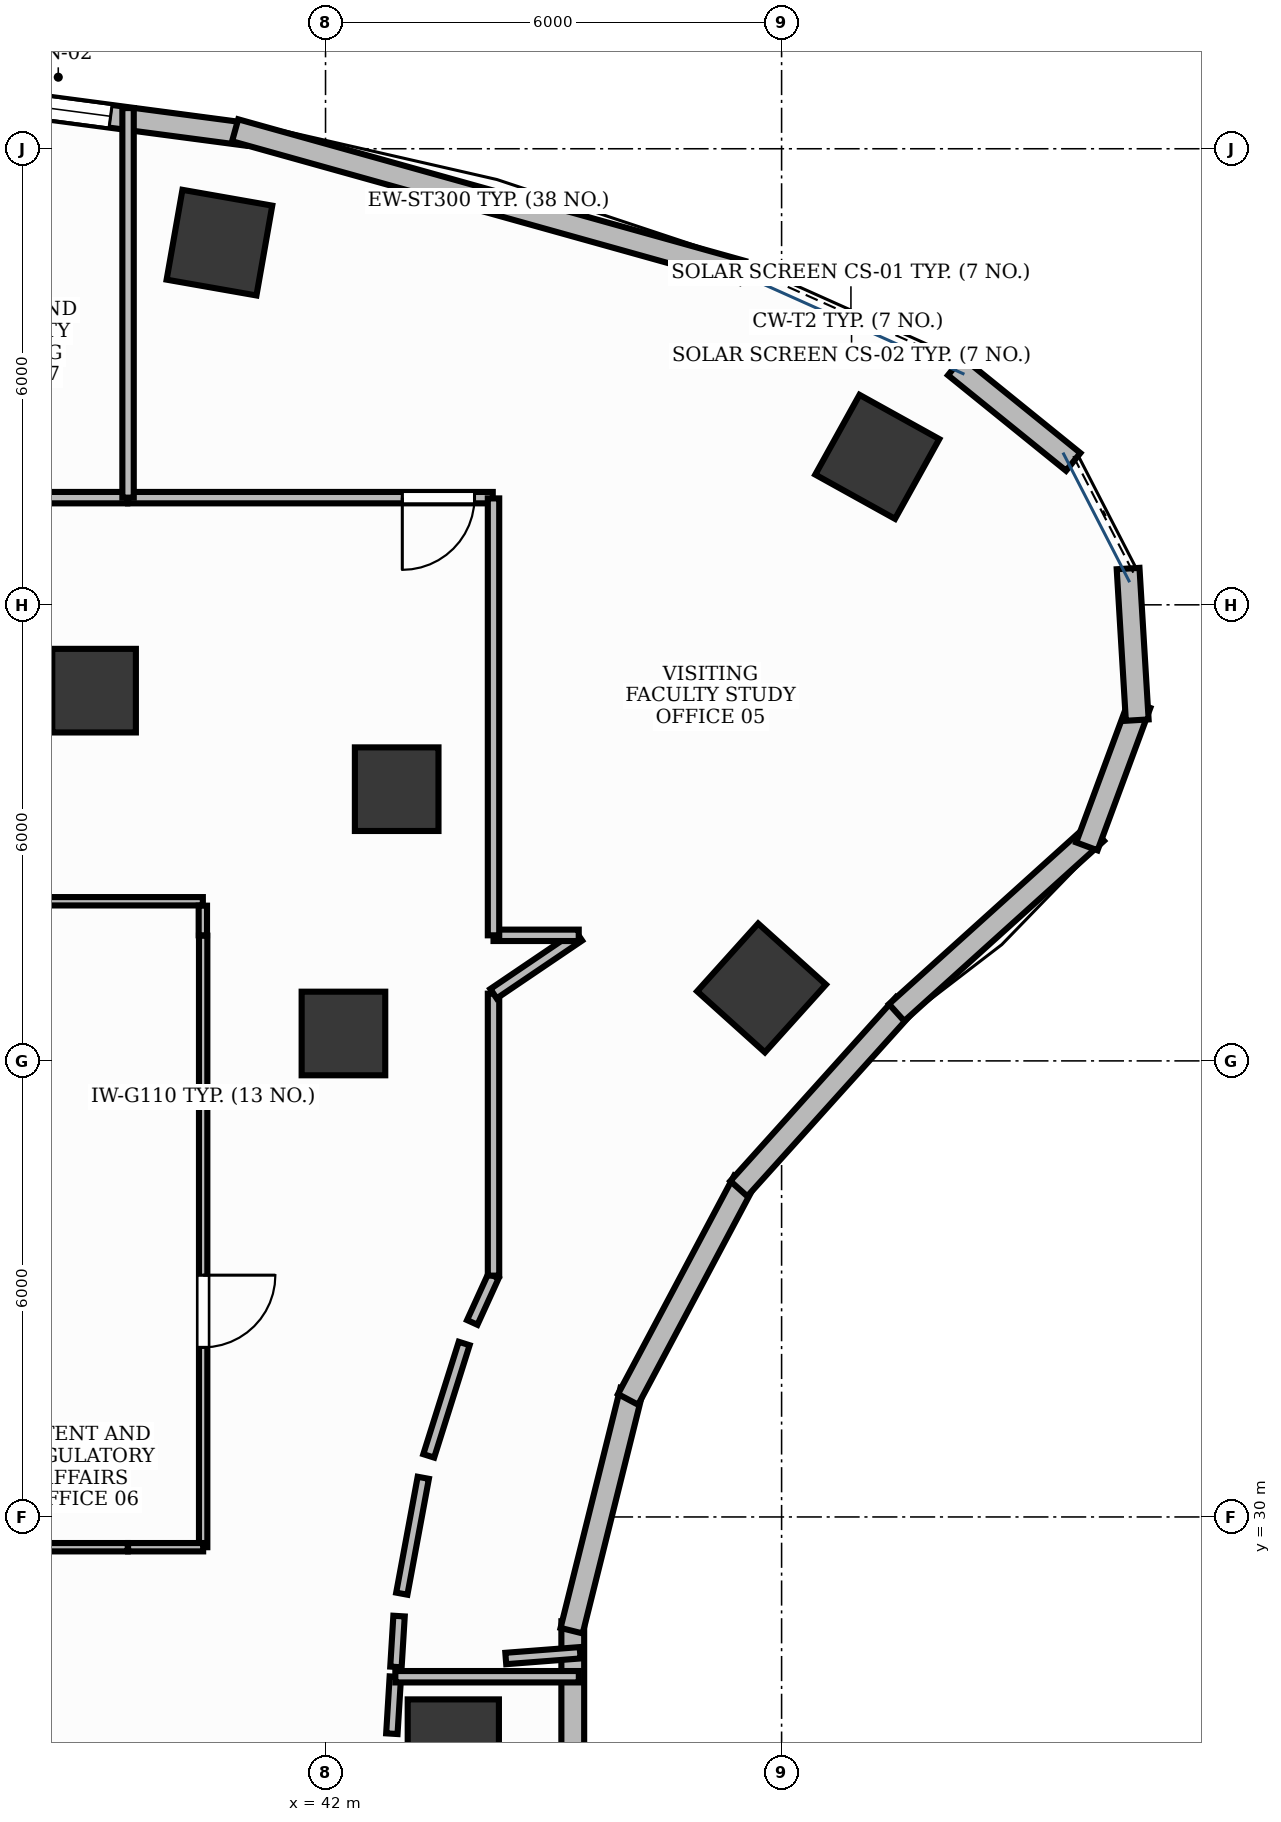
"""IFC4 building model, lengths in metres.
Left out: names, types, materials, properties, quantities, classifications, styles, units other than length and angle.
Written with IfcOpenShell. Run it as: python <this file> out.ifc"""

import sys

from ifc_helpers import new_model, si_unit, direction, frame, frame_2d, origin, origin_2d, place, context, subcontext, project, spatial, rectangle, extrude, element, fill, save


model = new_model("IFC4")
c1 = context("Model", 3, precision=1e-05, world=origin(), true_north=direction((0.0, 1.0)))
c2 = subcontext(c1, "Body", "Model", "MODEL_VIEW")
j1 = project(units=[si_unit("LENGTHUNIT", "METRE"), si_unit("PLANEANGLEUNIT", "RADIAN")], contexts=[c1])
p1 = place(None, origin())
s1 = spatial("IfcSite", under=j1, at=p1, CompositionType="ELEMENT")
p2 = place(p1, origin())
s2 = spatial("IfcBuilding", under=s1, at=p2, CompositionType="ELEMENT")
p3 = place(p2, frame((0.0, 0.0, 123.6)))
s3 = spatial("IfcBuildingStorey", under=s2, at=p3, CompositionType="ELEMENT", Elevation=123.6)
p4 = place(p3, frame((49.259, 43.947, -0.0), z_axis=(0.0, 0.0, 1.0), x_axis=(-0.874535078577, 0.484962262797, 0.0)))
e1 = element("IfcColumn", 1, at=p4, inside=s3, PredefinedType="COLUMN", context=c2, shape_type="SweptSolid", body=[
    extrude(rectangle(XDim=1.2, YDim=1.2, at=origin_2d()), origin(), (0.0, 0.0, 1.0), 3.901),
])
p5 = place(p3, frame((42.936, 39.575, -0.0), z_axis=(0.0, 0.0, 1.0), x_axis=(1.0, 0.0, 0.0)))
e2 = element("IfcColumn", 2, at=p5, inside=s3, PredefinedType="COLUMN", context=c2, shape_type="SweptSolid", body=[
    extrude(rectangle(XDim=1.1, YDim=1.1, at=origin_2d()), origin(), (0.0, 0.0, 1.0), 3.901),
])
p6 = place(p3, frame((40.604, 46.765, -0.0), z_axis=(0.0, 0.0, 1.0), x_axis=(-0.984868307662, 0.173304404339, 0.0)))
e3 = element("IfcColumn", 3, at=p6, inside=s3, PredefinedType="COLUMN", context=c2, shape_type="SweptSolid", body=[
    extrude(rectangle(XDim=1.2, YDim=1.2, at=origin_2d()), origin(), (0.0, 0.0, 1.0), 3.901),
])
p7 = place(p3, frame((38.955, 40.871, -0.0), z_axis=(0.0, 0.0, 1.0), x_axis=(1.0, 0.0, 0.0)))
e4 = element("IfcColumn", 4, at=p7, inside=s3, PredefinedType="COLUMN", context=c2, shape_type="SweptSolid", body=[
    extrude(rectangle(XDim=1.1, YDim=1.1, at=origin_2d()), origin(), (0.0, 0.0, 1.0), 3.901),
])
for number, where, z_axis, x_axis in (
    (5, (43.681, 27.0, -0.0), (0.0, 0.0, 1.0), (0.0, 1.0, 0.0)),
    (6, (47.736, 36.96, -0.0), (0.0, 0.0, 1.0), (0.669, 0.743, 0.0)),
):
    element("IfcColumn", number, at=place(p3, frame(where, z_axis=z_axis, x_axis=x_axis)), inside=s3, PredefinedType="COLUMN", context=c2, shape_type="SweptSolid", body=[
        extrude(rectangle(XDim=1.2, YDim=1.2, at=origin_2d()), origin(), (0.0, 0.0, 1.0), 3.901),
    ])
p8 = place(p3, frame((42.236, 36.361, -0.0), z_axis=(0.0, 0.0, 1.0), x_axis=(1.0, 0.0, 0.0)))
e7 = element("IfcColumn", 7, at=p8, inside=s3, PredefinedType="COLUMN", context=c2, shape_type="SweptSolid", body=[
    extrude(rectangle(XDim=1.1, YDim=1.1, at=origin_2d()), origin(), (0.0, 0.0, 1.0), 3.901),
])
p9 = place(p3, frame((40.964, 48.19, 0.0), z_axis=(0.0, 0.0, 1.0), x_axis=(-0.991369257822, 0.131099178664, 0.0)))
e8 = element("IfcWall", 8, at=p9, inside=s3, PredefinedType="STANDARD", context=c2, shape_type="SweptSolid", body=[
    extrude(rectangle(XDim=3.575, YDim=0.3, at=frame_2d((1.788, 0.0))), origin(), (0.0, 0.0, 1.0), 3.47),
])
p10 = place(p9, frame((1.808, 0.0, 0.95)))
e9 = element("IfcOpeningElement", 9, at=p10, cuts=e8, PredefinedType="OPENING", context=c2, shape_type="SweptSolid", body=[
    extrude(rectangle(XDim=1.5, YDim=1.8, at=frame_2d((0.75, 0.9))), frame((0.0, 0.165, 0.0), z_axis=(0.0, -1.0, 0.0), x_axis=(1.0, 0.0, 0.0)), (0.0, 0.0, 1.0), 0.33),
])
p11 = place(p3, frame((47.479, 46.38, 0.0), z_axis=(0.0, 0.0, 1.0), x_axis=(-0.963116215402, 0.269085777459, 0.0)))
e10 = element("IfcWall", 10, at=p11, inside=s3, PredefinedType="STANDARD", context=c2, shape_type="SweptSolid", body=[
    extrude(rectangle(XDim=6.924, YDim=0.3, at=frame_2d((3.462, 0.0))), origin(), (0.0, 0.0, 1.0), 3.9),
])
p12 = place(p3, frame((45.253, 25.372, 0.0), z_axis=(0.0, 0.0, 1.0), x_axis=(0.0, 1.0, 0.0)))
e11 = element("IfcWall", 11, at=p12, inside=s3, PredefinedType="STANDARD", context=c2, shape_type="SweptSolid", body=[
    extrude(rectangle(XDim=3.255, YDim=0.3, at=frame_2d((1.628, 0.0))), origin(), (0.0, 0.0, 1.0), 3.9),
])
p13 = place(p3, frame((45.238, 28.504, 0.0), z_axis=(0.0, 0.0, 1.0), x_axis=(0.241900409149, 0.970301083197, 0.0)))
e12 = element("IfcWall", 12, at=p13, inside=s3, PredefinedType="STANDARD", context=c2, shape_type="SweptSolid", body=[
    extrude(rectangle(XDim=3.256, YDim=0.3, at=frame_2d((1.628, 0.0))), origin(), (0.0, 0.0, 1.0), 3.9),
])
p14 = place(p3, frame((45.98, 31.547, 0.0), z_axis=(0.0, 0.0, 1.0), x_axis=(0.469451284634, 0.882958374645, 0.0)))
e13 = element("IfcWall", 13, at=p14, inside=s3, PredefinedType="STANDARD", context=c2, shape_type="SweptSolid", body=[
    extrude(rectangle(XDim=3.256, YDim=0.3, at=frame_2d((1.628, 0.0))), origin(), (0.0, 0.0, 1.0), 3.9),
])
p15 = place(p3, frame((47.437, 34.319, 0.0), z_axis=(0.0, 0.0, 1.0), x_axis=(0.669167727967, 0.743111399353, 0.0)))
e14 = element("IfcWall", 14, at=p15, inside=s3, PredefinedType="STANDARD", context=c2, shape_type="SweptSolid", body=[
    extrude(rectangle(XDim=3.255, YDim=0.3, at=frame_2d((1.628, 0.0))), origin(), (0.0, 0.0, 1.0), 3.9),
])
p16 = place(p3, frame((49.513, 36.636, 0.0), z_axis=(0.0, 0.0, 1.0), x_axis=(0.74255963233, 0.669779958221, 0.0)))
e15 = element("IfcWall", 15, at=p16, inside=s3, PredefinedType="STANDARD", context=c2, shape_type="SweptSolid", body=[
    extrude(rectangle(XDim=3.539, YDim=0.3, at=frame_2d((1.77, 0.0))), origin(), (0.0, 0.0, 1.0), 3.9),
])
p17 = place(p3, frame((52.016, 38.822, 0.0), z_axis=(0.0, 0.0, 1.0), x_axis=(0.347370087337, 0.937728117539, 0.0)))
e16 = element("IfcWall", 16, at=p17, inside=s3, PredefinedType="STANDARD", context=c2, shape_type="SweptSolid", body=[
    extrude(rectangle(XDim=1.997, YDim=0.3, at=frame_2d((0.999, 0.0))), origin(), (0.0, 0.0, 1.0), 3.9),
])
for number, where, z_axis, x_axis in (
    (17, (52.679, 40.483, 0.0), (0.0, 0.0, 1.0), (-0.06, 0.998, 0.0)),
    (18, (51.836, 43.881, 0.0), (0.0, 0.0, 1.0), (-0.777, 0.629, 0.0)),
):
    element("IfcWall", number, at=place(p3, frame(where, z_axis=z_axis, x_axis=x_axis)), inside=s3, PredefinedType="STANDARD", context=c2, shape_type="SweptSolid", body=[
        extrude(rectangle(XDim=1.998, YDim=0.3, at=frame_2d((0.999, 0.0))), origin(), (0.0, 0.0, 1.0), 3.9),
    ])
p18 = place(p3, frame((44.2, 43.41, 0.0), z_axis=(0.0, 0.0, 1.0), x_axis=(-1.0, 0.0, 0.0)))
e19 = element("IfcWall", 19, at=p18, inside=s3, PredefinedType="PARTITIONING", context=c2, shape_type="SweptSolid", body=[
    extrude(rectangle(XDim=4.798, YDim=0.15, at=frame_2d((2.399, 0.0))), origin(), (0.0, 0.0, 1.0), 2.91),
])
p19 = place(p18, frame((0.24, 0.0, 0.0)))
e20 = element("IfcOpeningElement", 20, at=p19, cuts=e19, PredefinedType="OPENING", context=c2, shape_type="SweptSolid", body=[
    extrude(rectangle(XDim=0.95, YDim=2.15, at=frame_2d((0.475, 1.075))), frame((0.0, 0.09, 0.0), z_axis=(0.0, -1.0, 0.0), x_axis=(1.0, 0.0, 0.0)), (0.0, 0.0, 1.0), 0.18),
])
p20 = place(p3, frame((40.39, 37.648, 0.0), z_axis=(0.0, 0.0, 1.0), x_axis=(0.0, -1.0, 0.0)))
e21 = element("IfcWall", 21, at=p20, inside=s3, PredefinedType="MOVABLE", context=c2, shape_type="SweptSolid", body=[
    extrude(rectangle(XDim=8.046, YDim=0.11, at=frame_2d((4.023, 0.0))), origin(), (0.0, 0.0, 1.0), 2.91),
])
p21 = place(p20, frame((4.467, 0.0, 0.0)))
e22 = element("IfcOpeningElement", 22, at=p21, cuts=e21, PredefinedType="OPENING", context=c2, shape_type="SweptSolid", body=[
    extrude(rectangle(XDim=0.95, YDim=2.15, at=frame_2d((0.475, 1.075))), frame((0.0, 0.07, 0.0), z_axis=(0.0, -1.0, 0.0), x_axis=(1.0, 0.0, 0.0)), (0.0, 0.0, 1.0), 0.14),
])
p22 = place(p3, frame((39.392, 43.41, 0.0), z_axis=(0.0, 0.0, 1.0), x_axis=(-1.0, 0.0, 0.0)))
e23 = element("IfcWall", 23, at=p22, inside=s3, PredefinedType="PARTITIONING", context=c2, shape_type="SweptSolid", body=[
    extrude(rectangle(XDim=3.842, YDim=0.15, at=frame_2d((1.921, 0.0))), origin(), (0.0, 0.0, 1.0), 2.91),
])
p23 = place(p22, frame((2.402, 0.0, 0.0)))
e24 = element("IfcOpeningElement", 24, at=p23, cuts=e23, PredefinedType="OPENING", context=c2, shape_type="SweptSolid", body=[
    extrude(rectangle(XDim=0.95, YDim=2.15, at=frame_2d((0.475, 1.075))), frame((0.0, 0.09, 0.0), z_axis=(0.0, -1.0, 0.0), x_axis=(1.0, 0.0, 0.0)), (0.0, 0.0, 1.0), 0.18),
])
p24 = place(p3, frame((42.873, 27.149, 0.0), z_axis=(0.0, 0.0, 1.0), x_axis=(0.061143125985, 0.998129008768, 0.0)))
e25 = element("IfcWall", 25, at=p24, inside=s3, PredefinedType="PARTITIONING", context=c2, shape_type="SweptSolid", body=[
    extrude(rectangle(XDim=0.751, YDim=0.15, at=frame_2d((0.375, 0.0))), origin(), (0.0, 0.0, 1.0), 2.91),
])
p25 = place(p3, frame((42.918, 27.898, 0.0), z_axis=(0.0, 0.0, 1.0), x_axis=(1.0, 0.0, 0.0)))
e26 = element("IfcWall", 26, at=p25, inside=s3, PredefinedType="PARTITIONING", context=c2, shape_type="SweptSolid", body=[
    extrude(rectangle(XDim=2.414, YDim=0.15, at=frame_2d((1.207, 0.0))), origin(), (0.0, 0.0, 1.0), 2.91),
])
p26 = place(p3, frame((45.35, 28.213, 0.0), z_axis=(0.0, 0.0, 1.0), x_axis=(-0.997039830609, -0.076886775058, 0.0)))
e27 = element("IfcWall", 27, at=p26, inside=s3, PredefinedType="PARTITIONING", context=c2, shape_type="SweptSolid", body=[
    extrude(rectangle(XDim=0.981, YDim=0.15, at=frame_2d((0.491, 0.0))), origin(), (0.0, 0.0, 1.0), 2.91),
])
p27 = place(p3, frame((42.926, 28.027, 0.0), z_axis=(0.0, 0.0, 1.0), x_axis=(0.061176697513, 0.998126951686, 0.0)))
e28 = element("IfcWall", 28, at=p27, inside=s3, PredefinedType="PARTITIONING", context=c2, shape_type="SweptSolid", body=[
    extrude(rectangle(XDim=0.67, YDim=0.15, at=frame_2d((0.335, 0.0))), origin(), (0.0, 0.0, 1.0), 2.91),
])
p28 = place(p3, frame((43.003, 28.991, 0.0), z_axis=(0.0, 0.0, 1.0), x_axis=(0.182168192784, 0.983267384559, 0.0)))
e29 = element("IfcWall", 29, at=p28, inside=s3, PredefinedType="PARTITIONING", context=c2, shape_type="SweptSolid", body=[
    extrude(rectangle(XDim=1.551, YDim=0.15, at=frame_2d((0.775, 0.0))), origin(), (0.0, 0.0, 1.0), 2.91),
])
p29 = place(p3, frame((43.358, 30.803, 0.0), z_axis=(0.0, 0.0, 1.0), x_axis=(0.300641414783, 0.953737248783, 0.0)))
e30 = element("IfcWall", 30, at=p29, inside=s3, PredefinedType="PARTITIONING", context=c2, shape_type="SweptSolid", body=[
    extrude(rectangle(XDim=1.55, YDim=0.15, at=frame_2d((0.775, 0.0))), origin(), (0.0, 0.0, 1.0), 2.91),
])
p30 = place(p3, frame((43.93, 32.559, 0.0), z_axis=(0.0, 0.0, 1.0), x_axis=(0.414377467152, 0.910105111905, 0.0)))
e31 = element("IfcWall", 31, at=p30, inside=s3, PredefinedType="PARTITIONING", context=c2, shape_type="SweptSolid", body=[
    extrude(rectangle(XDim=0.672, YDim=0.15, at=frame_2d((0.336, 0.0))), origin(), (0.0, 0.0, 1.0), 2.91),
])
p31 = place(p3, frame((44.21, 33.175, 0.0), z_axis=(0.0, 0.0, 1.0), x_axis=(0.0, 1.0, 0.0)))
e32 = element("IfcWall", 32, at=p31, inside=s3, PredefinedType="PARTITIONING", context=c2, shape_type="SweptSolid", body=[
    extrude(rectangle(XDim=3.709, YDim=0.15, at=frame_2d((1.854, 0.0))), origin(), (0.0, 0.0, 1.0), 2.91),
])
p32 = place(p3, frame((44.21, 36.884, 0.0), z_axis=(0.0, 0.0, 1.0), x_axis=(0.828042645571, 0.560665120295, 0.0)))
e33 = element("IfcWall", 33, at=p32, inside=s3, PredefinedType="PARTITIONING", context=c2, shape_type="SweptSolid", body=[
    extrude(rectangle(XDim=1.357, YDim=0.15, at=frame_2d((0.678, 0.0))), origin(), (0.0, 0.0, 1.0), 2.91),
])
p33 = place(p3, frame((45.331, 37.652, 0.0), z_axis=(0.0, 0.0, 1.0), x_axis=(-1.0, 0.0, 0.0)))
e34 = element("IfcWall", 34, at=p33, inside=s3, PredefinedType="PARTITIONING", context=c2, shape_type="SweptSolid", body=[
    extrude(rectangle(XDim=1.121, YDim=0.15, at=frame_2d((0.561, 0.0))), origin(), (0.0, 0.0, 1.0), 2.91),
])
p34 = place(p3, frame((44.21, 37.652, 0.0), z_axis=(0.0, 0.0, 1.0), x_axis=(0.0, 1.0, 0.0)))
e35 = element("IfcWall", 35, at=p34, inside=s3, PredefinedType="PARTITIONING", context=c2, shape_type="SweptSolid", body=[
    extrude(rectangle(XDim=5.748, YDim=0.15, at=frame_2d((2.874, 0.0))), origin(), (0.0, 0.0, 1.0), 2.91),
])
p35 = place(p3, frame((39.402, 43.41, 0.0), z_axis=(0.0, 0.0, 1.0), x_axis=(0.0, 1.0, 0.0)))
e36 = element("IfcWall", 36, at=p35, inside=s3, PredefinedType="PARTITIONING", context=c2, shape_type="SweptSolid", body=[
    extrude(rectangle(XDim=5.125, YDim=0.15, at=frame_2d((2.563, 0.0))), origin(), (0.0, 0.0, 1.0), 2.91),
])
p36 = place(p3, frame((40.39, 29.602, 0.0), z_axis=(0.0, 0.0, 1.0), x_axis=(-1.0, 0.0, 0.0)))
e37 = element("IfcWall", 37, at=p36, inside=s3, PredefinedType="MOVABLE", context=c2, shape_type="SweptSolid", body=[
    extrude(rectangle(XDim=0.988, YDim=0.11, at=frame_2d((0.494, 0.0))), origin(), (0.0, 0.0, 1.0), 2.91),
])
p37 = place(p3, frame((39.398, 29.602, 0.0), z_axis=(0.0, 0.0, 1.0), x_axis=(-1.0, 0.0, 0.0)))
e38 = element("IfcWall", 38, at=p37, inside=s3, PredefinedType="MOVABLE", context=c2, shape_type="SweptSolid", body=[
    extrude(rectangle(XDim=2.038, YDim=0.11, at=frame_2d((1.019, 0.0))), origin(), (0.0, 0.0, 1.0), 2.91),
])
p38 = place(p3, frame((37.21, 38.1, 0.0), z_axis=(0.0, 0.0, 1.0), x_axis=(1.0, 0.0, 0.0)))
e39 = element("IfcWall", 39, at=p38, inside=s3, PredefinedType="MOVABLE", context=c2, shape_type="SweptSolid", body=[
    extrude(rectangle(XDim=3.176, YDim=0.11, at=frame_2d((1.588, 0.0))), origin(), (0.0, 0.0, 1.0), 2.91),
])
p39 = place(p3, frame((40.386, 38.042, 0.0), z_axis=(0.0, 0.0, 1.0), x_axis=(0.0, -1.0, 0.0)))
e40 = element("IfcWall", 40, at=p39, inside=s3, PredefinedType="MOVABLE", context=c2, shape_type="SweptSolid", body=[
    extrude(rectangle(XDim=0.39, YDim=0.11, at=frame_2d((0.195, 0.0))), origin(), (0.0, 0.0, 1.0), 2.91),
])
p40 = place(p10, origin())
e41 = element("IfcWindow", 41, at=p40, inside=s3, PartitioningType="DOUBLE_PANEL_VERTICAL", PredefinedType="WINDOW", context=c2, shape_type="SweptSolid", body=[
    extrude(rectangle(XDim=1.5, YDim=1.8, at=frame_2d((0.75, 0.9))), frame((0.0, 0.03, 0.0), z_axis=(0.0, -1.0, 0.0), x_axis=(1.0, 0.0, 0.0)), (0.0, 0.0, 1.0), 0.06),
])
fill(e9, e41)
p41 = place(p19, origin())
e42 = element("IfcDoor", 42, at=p41, inside=s3, OperationType="SINGLE_SWING_RIGHT", PredefinedType="DOOR", context=c2, shape_type="SweptSolid", body=[
    extrude(rectangle(XDim=0.95, YDim=2.15, at=frame_2d((0.475, 1.075))), frame((0.0, 0.025, 0.0), z_axis=(0.0, -1.0, 0.0), x_axis=(1.0, 0.0, 0.0)), (0.0, 0.0, 1.0), 0.05),
])
fill(e20, e42)
p42 = place(p21, origin())
e43 = element("IfcDoor", 43, at=p42, inside=s3, OperationType="SINGLE_SWING_LEFT", PredefinedType="DOOR", context=c2, shape_type="SweptSolid", body=[
    extrude(rectangle(XDim=0.95, YDim=2.15, at=frame_2d((0.475, 1.075))), frame((0.0, 0.025, 0.0), z_axis=(0.0, -1.0, 0.0), x_axis=(1.0, 0.0, 0.0)), (0.0, 0.0, 1.0), 0.05),
])
fill(e22, e43)
save(model, sys.argv[1])
